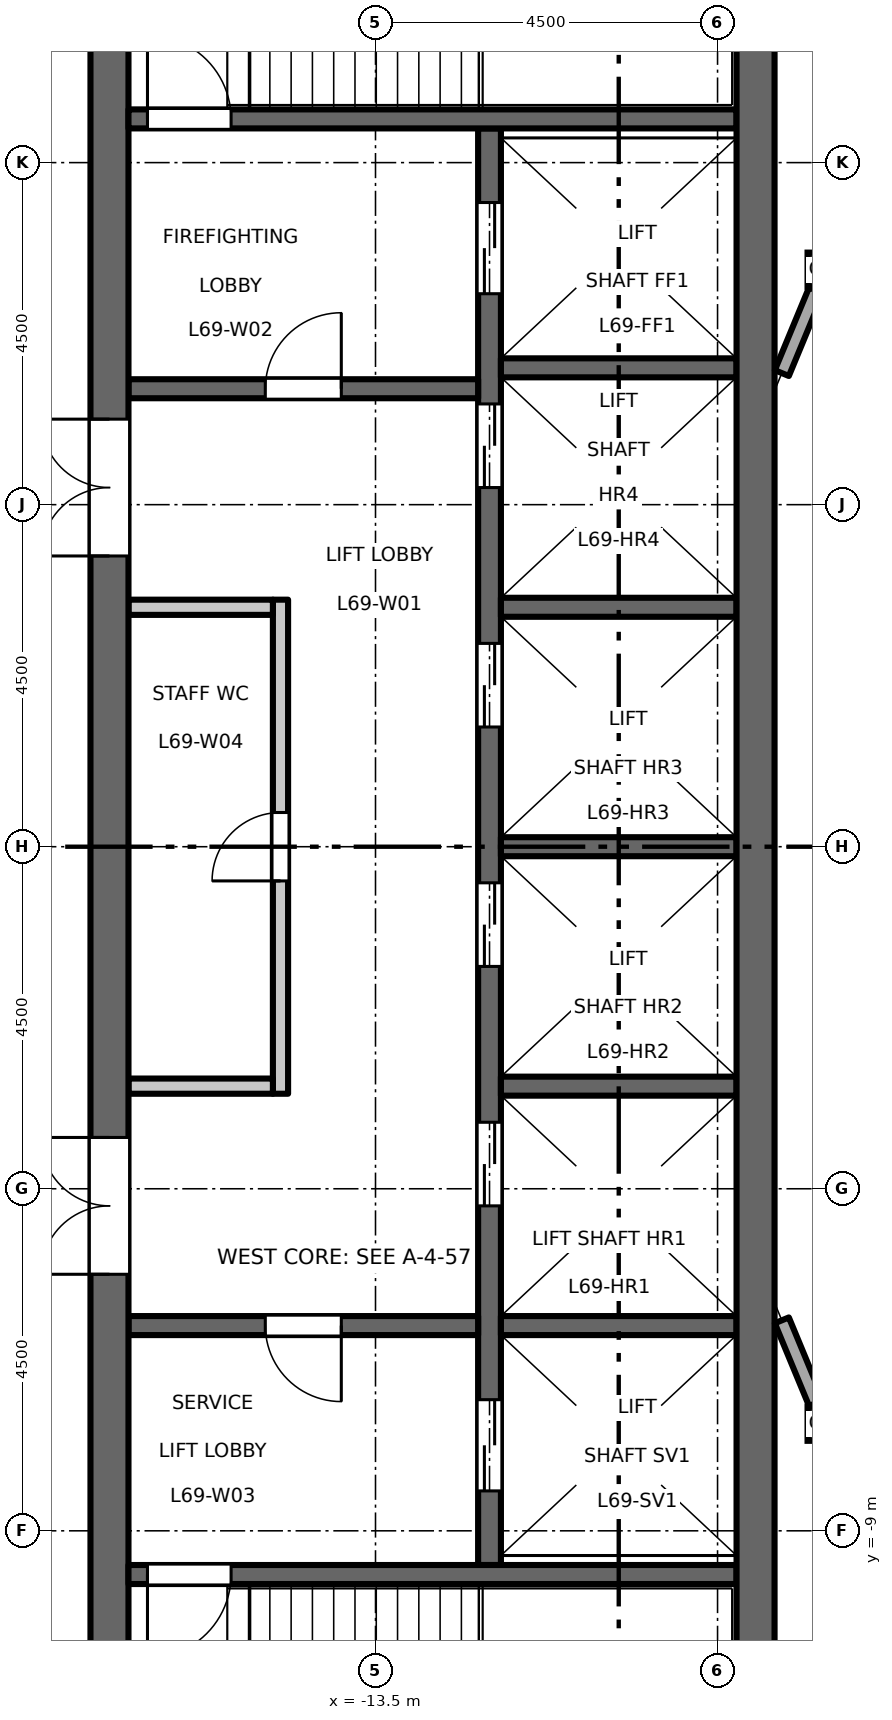
"""IFC4 building model, lengths in metres.
Left out: names, types, materials, properties, quantities, classifications, styles, units other than length and angle.
Written with IfcOpenShell. Run it as: python <this file> out.ifc"""

import sys

from ifc_helpers import new_model, si_unit, direction, frame, frame_2d, origin, origin_2d, place, context, subcontext, project, spatial, rectangle, hollow_rectangle, extrude, element, fill, save


model = new_model("IFC4")
c1 = context("Model", 3, precision=1e-05, world=origin(), true_north=direction((0.0, 1.0)))
c2 = subcontext(c1, "Body", "Model", "MODEL_VIEW")
j1 = project(units=[si_unit("LENGTHUNIT", "METRE"), si_unit("PLANEANGLEUNIT", "RADIAN")], contexts=[c1])
p1 = place(None, origin())
s1 = spatial("IfcSite", under=j1, at=p1, CompositionType="ELEMENT")
p2 = place(p1, origin())
s2 = spatial("IfcBuilding", under=s1, at=p2, CompositionType="ELEMENT")
p3 = place(p2, frame((0.0, 0.0, 321.2)))
s3 = spatial("IfcBuildingStorey", under=s2, at=p3, CompositionType="ELEMENT", Elevation=321.2)
for number, where, z_axis, x_axis in (
    (1, (-7.591, -7.591, 0.0), (0.0, 0.0, 1.0), (1.0, 0.0, 0.0)),
    (2, (-7.591, 7.591, 0.0), (0.0, 0.0, 1.0), (1.0, 0.0, 0.0)),
):
    element("IfcColumn", number, at=place(p3, frame(where, z_axis=z_axis, x_axis=x_axis)), inside=s3, PredefinedType="COLUMN", context=c2, shape_type="SweptSolid", body=[
        extrude(hollow_rectangle(XDim=0.45, YDim=0.45, WallThickness=0.022, at=origin_2d()), origin(), (0.0, 0.0, 1.0), 4.5),
    ])
p4 = place(p3, frame((-14.75, -3.25, 0.0), z_axis=(0.0, 0.0, 1.0), x_axis=(0.0, 1.0, 0.0)))
e3 = element("IfcWall", 3, at=p4, inside=s3, PredefinedType="PARTITIONING", context=c2, shape_type="SweptSolid", body=[
    extrude(rectangle(XDim=6.5, YDim=0.2, at=frame_2d((3.25, 0.0))), origin(), (0.0, 0.0, 1.0), 4.35),
])
p5 = place(p4, frame((2.8, 0.0, 0.0)))
e4 = element("IfcOpeningElement", 4, at=p5, cuts=e3, PredefinedType="OPENING", context=c2, shape_type="SweptSolid", body=[
    extrude(rectangle(XDim=0.9, YDim=2.1, at=frame_2d((0.45, 1.05))), frame((0.0, 0.11, 0.0), z_axis=(0.0, -1.0, 0.0), x_axis=(1.0, 0.0, 0.0)), (0.0, 0.0, 1.0), 0.22),
])
for number, where, z_axis, x_axis in (
    (5, (-14.85, 3.15, 0.0), (0.0, 0.0, 1.0), (-1.0, 0.0, 0.0)),
    (6, (-14.85, -3.15, 0.0), (0.0, 0.0, 1.0), (-1.0, 0.0, 0.0)),
):
    element("IfcWall", number, at=place(p3, frame(where, z_axis=z_axis, x_axis=x_axis)), inside=s3, PredefinedType="PARTITIONING", context=c2, shape_type="SweptSolid", body=[
        extrude(rectangle(XDim=1.9, YDim=0.2, at=frame_2d((0.95, 0.0))), origin(), (0.0, 0.0, 1.0), 4.35),
    ])
p6 = place(p3, frame((-12.0, -9.45, 0.0), z_axis=(0.0, 0.0, 1.0), x_axis=(0.0, 1.0, 0.0)))
e7 = element("IfcWall", 7, at=p6, inside=s3, PredefinedType="SHEAR", context=c2, shape_type="SweptSolid", body=[
    extrude(rectangle(XDim=18.9, YDim=0.3, at=frame_2d((9.45, 0.0))), origin(), (0.0, 0.0, 1.0), 4.35),
])
p7 = place(p6, frame((4.725, 0.0, 0.0)))
e8 = element("IfcOpeningElement", 8, at=p7, cuts=e7, PredefinedType="OPENING", context=c2, shape_type="SweptSolid", body=[
    extrude(rectangle(XDim=1.1, YDim=2.1, at=frame_2d((0.55, 1.05))), frame((0.0, 0.16, 0.0), z_axis=(0.0, -1.0, 0.0), x_axis=(1.0, 0.0, 0.0)), (0.0, 0.0, 1.0), 0.32),
])
p8 = place(p6, frame((7.875, 0.0, 0.0)))
e9 = element("IfcOpeningElement", 9, at=p8, cuts=e7, PredefinedType="OPENING", context=c2, shape_type="SweptSolid", body=[
    extrude(rectangle(XDim=1.1, YDim=2.1, at=frame_2d((0.55, 1.05))), frame((0.0, 0.16, 0.0), z_axis=(0.0, -1.0, 0.0), x_axis=(1.0, 0.0, 0.0)), (0.0, 0.0, 1.0), 0.32),
])
p9 = place(p6, frame((11.025, 0.0, 0.0)))
e10 = element("IfcOpeningElement", 10, at=p9, cuts=e7, PredefinedType="OPENING", context=c2, shape_type="SweptSolid", body=[
    extrude(rectangle(XDim=1.1, YDim=2.1, at=frame_2d((0.55, 1.05))), frame((0.0, 0.16, 0.0), z_axis=(0.0, -1.0, 0.0), x_axis=(1.0, 0.0, 0.0)), (0.0, 0.0, 1.0), 0.32),
])
p10 = place(p6, frame((14.175, 0.0, 0.0)))
e11 = element("IfcOpeningElement", 11, at=p10, cuts=e7, PredefinedType="OPENING", context=c2, shape_type="SweptSolid", body=[
    extrude(rectangle(XDim=1.1, YDim=2.1, at=frame_2d((0.55, 1.05))), frame((0.0, 0.16, 0.0), z_axis=(0.0, -1.0, 0.0), x_axis=(1.0, 0.0, 0.0)), (0.0, 0.0, 1.0), 0.32),
])
p11 = place(p6, frame((16.725, 0.0, 0.0)))
e12 = element("IfcOpeningElement", 12, at=p11, cuts=e7, PredefinedType="OPENING", context=c2, shape_type="SweptSolid", body=[
    extrude(rectangle(XDim=1.2, YDim=2.1, at=frame_2d((0.6, 1.05))), frame((0.0, 0.16, 0.0), z_axis=(0.0, -1.0, 0.0), x_axis=(1.0, 0.0, 0.0)), (0.0, 0.0, 1.0), 0.32),
])
p12 = place(p6, frame((0.975, 0.0, 0.0)))
e13 = element("IfcOpeningElement", 13, at=p12, cuts=e7, PredefinedType="OPENING", context=c2, shape_type="SweptSolid", body=[
    extrude(rectangle(XDim=1.2, YDim=2.1, at=frame_2d((0.6, 1.05))), frame((0.0, 0.16, 0.0), z_axis=(0.0, -1.0, 0.0), x_axis=(1.0, 0.0, 0.0)), (0.0, 0.0, 1.0), 0.32),
])
p13 = place(p3, frame((-12.15, 6.025, 0.0), z_axis=(0.0, 0.0, 1.0), x_axis=(-1.0, 0.0, 0.0)))
e14 = element("IfcWall", 14, at=p13, inside=s3, PredefinedType="SHEAR", context=c2, shape_type="SweptSolid", body=[
    extrude(rectangle(XDim=4.6, YDim=0.25, at=frame_2d((2.3, 0.0))), origin(), (0.0, 0.0, 1.0), 4.35),
])
p14 = place(p13, frame((1.8, 0.0, 0.0)))
e15 = element("IfcOpeningElement", 15, at=p14, cuts=e14, PredefinedType="OPENING", context=c2, shape_type="SweptSolid", body=[
    extrude(rectangle(XDim=1.0, YDim=2.1, at=frame_2d((0.5, 1.05))), frame((0.0, 0.135, 0.0), z_axis=(0.0, -1.0, 0.0), x_axis=(1.0, 0.0, 0.0)), (0.0, 0.0, 1.0), 0.27),
])
p15 = place(p3, frame((-12.15, -6.3, 0.0), z_axis=(0.0, 0.0, 1.0), x_axis=(-1.0, 0.0, 0.0)))
e16 = element("IfcWall", 16, at=p15, inside=s3, PredefinedType="SHEAR", context=c2, shape_type="SweptSolid", body=[
    extrude(rectangle(XDim=4.6, YDim=0.25, at=frame_2d((2.3, 0.0))), origin(), (0.0, 0.0, 1.0), 4.35),
])
p16 = place(p15, frame((1.8, 0.0, 0.0)))
e17 = element("IfcOpeningElement", 17, at=p16, cuts=e16, PredefinedType="OPENING", context=c2, shape_type="SweptSolid", body=[
    extrude(rectangle(XDim=1.0, YDim=2.1, at=frame_2d((0.5, 1.05))), frame((0.0, 0.135, 0.0), z_axis=(0.0, -1.0, 0.0), x_axis=(1.0, 0.0, 0.0)), (0.0, 0.0, 1.0), 0.27),
])
p17 = place(p3, frame((-17.0, -13.0, 0.0), z_axis=(0.0, 0.0, 1.0), x_axis=(0.0, 1.0, 0.0)))
e18 = element("IfcWall", 18, at=p17, inside=s3, PredefinedType="SHEAR", context=c2, shape_type="SweptSolid", body=[
    extrude(rectangle(XDim=26.0, YDim=0.5, at=frame_2d((13.0, 0.0))), origin(), (0.0, 0.0, 1.0), 4.35),
])
p18 = place(p17, frame((16.825, 0.0, 0.0)))
e19 = element("IfcOpeningElement", 19, at=p18, cuts=e18, PredefinedType="OPENING", context=c2, shape_type="SweptSolid", body=[
    extrude(rectangle(XDim=1.8, YDim=2.1, at=frame_2d((0.9, 1.05))), frame((0.0, 0.26, 0.0), z_axis=(0.0, -1.0, 0.0), x_axis=(1.0, 0.0, 0.0)), (0.0, 0.0, 1.0), 0.52),
])
p19 = place(p17, frame((7.375, 0.0, 0.0)))
e20 = element("IfcOpeningElement", 20, at=p19, cuts=e18, PredefinedType="OPENING", context=c2, shape_type="SweptSolid", body=[
    extrude(rectangle(XDim=1.8, YDim=2.1, at=frame_2d((0.9, 1.05))), frame((0.0, 0.26, 0.0), z_axis=(0.0, -1.0, 0.0), x_axis=(1.0, 0.0, 0.0)), (0.0, 0.0, 1.0), 0.52),
])
for number, where, z_axis, x_axis in (
    (21, (-8.75, 0.0, 0.0), (0.0, 0.0, 1.0), (-1.0, 0.0, 0.0)),
    (22, (-8.75, 3.15, 0.0), (0.0, 0.0, 1.0), (-1.0, 0.0, 0.0)),
    (23, (-8.75, 6.3, 0.0), (0.0, 0.0, 1.0), (-1.0, 0.0, 0.0)),
    (24, (-8.75, -3.15, 0.0), (0.0, 0.0, 1.0), (-1.0, 0.0, 0.0)),
    (25, (-8.75, -6.3, 0.0), (0.0, 0.0, 1.0), (-1.0, 0.0, 0.0)),
):
    element("IfcWall", number, at=place(p3, frame(where, z_axis=z_axis, x_axis=x_axis)), inside=s3, PredefinedType="SHEAR", context=c2, shape_type="SweptSolid", body=[
        extrude(rectangle(XDim=3.1, YDim=0.25, at=frame_2d((1.55, 0.0))), origin(), (0.0, 0.0, 1.0), 4.35),
    ])
p20 = place(p3, frame((-8.75, 9.575, 0.0), z_axis=(0.0, 0.0, 1.0), x_axis=(-1.0, 0.0, 0.0)))
e26 = element("IfcWall", 26, at=p20, inside=s3, PredefinedType="SHEAR", context=c2, shape_type="SweptSolid", body=[
    extrude(rectangle(XDim=8.0, YDim=0.25, at=frame_2d((4.0, 0.0))), origin(), (0.0, 0.0, 1.0), 4.35),
])
p21 = place(p20, frame((6.65, 0.0, 0.0)))
e27 = element("IfcOpeningElement", 27, at=p21, cuts=e26, PredefinedType="OPENING", context=c2, shape_type="SweptSolid", body=[
    extrude(rectangle(XDim=1.1, YDim=2.1, at=frame_2d((0.55, 1.05))), frame((0.0, 0.135, 0.0), z_axis=(0.0, -1.0, 0.0), x_axis=(1.0, 0.0, 0.0)), (0.0, 0.0, 1.0), 0.27),
])
p22 = place(p3, frame((-8.75, -9.575, 0.0), z_axis=(0.0, 0.0, 1.0), x_axis=(-1.0, 0.0, 0.0)))
e28 = element("IfcWall", 28, at=p22, inside=s3, PredefinedType="SHEAR", context=c2, shape_type="SweptSolid", body=[
    extrude(rectangle(XDim=8.0, YDim=0.25, at=frame_2d((4.0, 0.0))), origin(), (0.0, 0.0, 1.0), 4.35),
])
p23 = place(p22, frame((6.65, 0.0, 0.0)))
e29 = element("IfcOpeningElement", 29, at=p23, cuts=e28, PredefinedType="OPENING", context=c2, shape_type="SweptSolid", body=[
    extrude(rectangle(XDim=1.1, YDim=2.1, at=frame_2d((0.55, 1.05))), frame((0.0, 0.135, 0.0), z_axis=(0.0, -1.0, 0.0), x_axis=(1.0, 0.0, 0.0)), (0.0, 0.0, 1.0), 0.27),
])
p24 = place(p3, frame((-8.5, -13.0, 0.0), z_axis=(0.0, 0.0, 1.0), x_axis=(0.0, 1.0, 0.0)))
e30 = element("IfcWall", 30, at=p24, inside=s3, PredefinedType="SHEAR", context=c2, shape_type="SweptSolid", body=[
    extrude(rectangle(XDim=26.0, YDim=0.5, at=frame_2d((13.0, 0.0))), origin(), (0.0, 0.0, 1.0), 4.35),
])
for number, where, z_axis, x_axis in (
    (31, (-7.703, 7.319, 0.0), (0.0, 0.0, 1.0), (-0.383, -0.924, 0.0)),
    (32, (-8.154, -6.231, 0.0), (0.0, 0.0, 1.0), (0.383, -0.924, 0.0)),
):
    element("IfcWall", number, at=place(p3, frame(where, z_axis=z_axis, x_axis=x_axis)), inside=s3, PredefinedType="STANDARD", context=c2, shape_type="SweptSolid", body=[
        extrude(rectangle(XDim=1.178, YDim=0.2, at=frame_2d((0.589, 0.0))), origin(), (0.0, 0.0, 1.0), 4.01),
    ])
p25 = place(p14, origin())
e33 = element("IfcDoor", 33, at=p25, inside=s3, OperationType="SINGLE_SWING_LEFT", PredefinedType="DOOR", context=c2, shape_type="SweptSolid", body=[
    extrude(rectangle(XDim=1.0, YDim=2.1, at=frame_2d((0.5, 1.05))), frame((0.0, 0.025, 0.0), z_axis=(0.0, -1.0, 0.0), x_axis=(1.0, 0.0, 0.0)), (0.0, 0.0, 1.0), 0.05),
])
fill(e15, e33)
p26 = place(p16, origin())
e34 = element("IfcDoor", 34, at=p26, inside=s3, OperationType="SINGLE_SWING_RIGHT", PredefinedType="DOOR", context=c2, shape_type="SweptSolid", body=[
    extrude(rectangle(XDim=1.0, YDim=2.1, at=frame_2d((0.5, 1.05))), frame((0.0, 0.025, 0.0), z_axis=(0.0, -1.0, 0.0), x_axis=(1.0, 0.0, 0.0)), (0.0, 0.0, 1.0), 0.05),
])
fill(e17, e34)
p27 = place(p21, origin())
e35 = element("IfcDoor", 35, at=p27, inside=s3, OperationType="SINGLE_SWING_RIGHT", PredefinedType="DOOR", context=c2, shape_type="SweptSolid", body=[
    extrude(rectangle(XDim=1.1, YDim=2.1, at=frame_2d((0.55, 1.05))), frame((0.0, 0.025, 0.0), z_axis=(0.0, -1.0, 0.0), x_axis=(1.0, 0.0, 0.0)), (0.0, 0.0, 1.0), 0.05),
])
fill(e27, e35)
p28 = place(p23, origin())
e36 = element("IfcDoor", 36, at=p28, inside=s3, OperationType="SINGLE_SWING_LEFT", PredefinedType="DOOR", context=c2, shape_type="SweptSolid", body=[
    extrude(rectangle(XDim=1.1, YDim=2.1, at=frame_2d((0.55, 1.05))), frame((0.0, 0.025, 0.0), z_axis=(0.0, -1.0, 0.0), x_axis=(1.0, 0.0, 0.0)), (0.0, 0.0, 1.0), 0.05),
])
fill(e29, e36)
p29 = place(p18, origin())
e37 = element("IfcDoor", 37, at=p29, inside=s3, OperationType="DOUBLE_DOOR_DOUBLE_SWING", PredefinedType="DOOR", context=c2, shape_type="SweptSolid", body=[
    extrude(rectangle(XDim=1.8, YDim=2.1, at=frame_2d((0.9, 1.05))), frame((0.0, 0.025, 0.0), z_axis=(0.0, -1.0, 0.0), x_axis=(1.0, 0.0, 0.0)), (0.0, 0.0, 1.0), 0.05),
])
fill(e19, e37)
p30 = place(p19, origin())
e38 = element("IfcDoor", 38, at=p30, inside=s3, OperationType="DOUBLE_DOOR_DOUBLE_SWING", PredefinedType="DOOR", context=c2, shape_type="SweptSolid", body=[
    extrude(rectangle(XDim=1.8, YDim=2.1, at=frame_2d((0.9, 1.05))), frame((0.0, 0.025, 0.0), z_axis=(0.0, -1.0, 0.0), x_axis=(1.0, 0.0, 0.0)), (0.0, 0.0, 1.0), 0.05),
])
fill(e20, e38)
p31 = place(p7, origin())
e39 = element("IfcDoor", 39, at=p31, inside=s3, OperationType="DOUBLE_DOOR_SLIDING", PredefinedType="DOOR", context=c2, shape_type="SweptSolid", body=[
    extrude(rectangle(XDim=1.1, YDim=2.1, at=frame_2d((0.55, 1.05))), frame((0.0, 0.025, 0.0), z_axis=(0.0, -1.0, 0.0), x_axis=(1.0, 0.0, 0.0)), (0.0, 0.0, 1.0), 0.05),
])
fill(e8, e39)
p32 = place(p8, origin())
e40 = element("IfcDoor", 40, at=p32, inside=s3, OperationType="DOUBLE_DOOR_SLIDING", PredefinedType="DOOR", context=c2, shape_type="SweptSolid", body=[
    extrude(rectangle(XDim=1.1, YDim=2.1, at=frame_2d((0.55, 1.05))), frame((0.0, 0.025, 0.0), z_axis=(0.0, -1.0, 0.0), x_axis=(1.0, 0.0, 0.0)), (0.0, 0.0, 1.0), 0.05),
])
fill(e9, e40)
p33 = place(p9, origin())
e41 = element("IfcDoor", 41, at=p33, inside=s3, OperationType="DOUBLE_DOOR_SLIDING", PredefinedType="DOOR", context=c2, shape_type="SweptSolid", body=[
    extrude(rectangle(XDim=1.1, YDim=2.1, at=frame_2d((0.55, 1.05))), frame((0.0, 0.025, 0.0), z_axis=(0.0, -1.0, 0.0), x_axis=(1.0, 0.0, 0.0)), (0.0, 0.0, 1.0), 0.05),
])
fill(e10, e41)
p34 = place(p10, origin())
e42 = element("IfcDoor", 42, at=p34, inside=s3, OperationType="DOUBLE_DOOR_SLIDING", PredefinedType="DOOR", context=c2, shape_type="SweptSolid", body=[
    extrude(rectangle(XDim=1.1, YDim=2.1, at=frame_2d((0.55, 1.05))), frame((0.0, 0.025, 0.0), z_axis=(0.0, -1.0, 0.0), x_axis=(1.0, 0.0, 0.0)), (0.0, 0.0, 1.0), 0.05),
])
fill(e11, e42)
p35 = place(p11, origin())
e43 = element("IfcDoor", 43, at=p35, inside=s3, OperationType="DOUBLE_DOOR_SLIDING", PredefinedType="DOOR", context=c2, shape_type="SweptSolid", body=[
    extrude(rectangle(XDim=1.2, YDim=2.1, at=frame_2d((0.6, 1.05))), frame((0.0, 0.025, 0.0), z_axis=(0.0, -1.0, 0.0), x_axis=(1.0, 0.0, 0.0)), (0.0, 0.0, 1.0), 0.05),
])
fill(e12, e43)
p36 = place(p12, origin())
e44 = element("IfcDoor", 44, at=p36, inside=s3, OperationType="DOUBLE_DOOR_SLIDING", PredefinedType="DOOR", context=c2, shape_type="SweptSolid", body=[
    extrude(rectangle(XDim=1.2, YDim=2.1, at=frame_2d((0.6, 1.05))), frame((0.0, 0.025, 0.0), z_axis=(0.0, -1.0, 0.0), x_axis=(1.0, 0.0, 0.0)), (0.0, 0.0, 1.0), 0.05),
])
fill(e13, e44)
p37 = place(p5, origin())
e45 = element("IfcDoor", 45, at=p37, inside=s3, OperationType="SINGLE_SWING_RIGHT", PredefinedType="DOOR", context=c2, shape_type="SweptSolid", body=[
    extrude(rectangle(XDim=0.9, YDim=2.1, at=frame_2d((0.45, 1.05))), frame((0.0, 0.025, 0.0), z_axis=(0.0, -1.0, 0.0), x_axis=(1.0, 0.0, 0.0)), (0.0, 0.0, 1.0), 0.05),
])
fill(e4, e45)
save(model, sys.argv[1])
